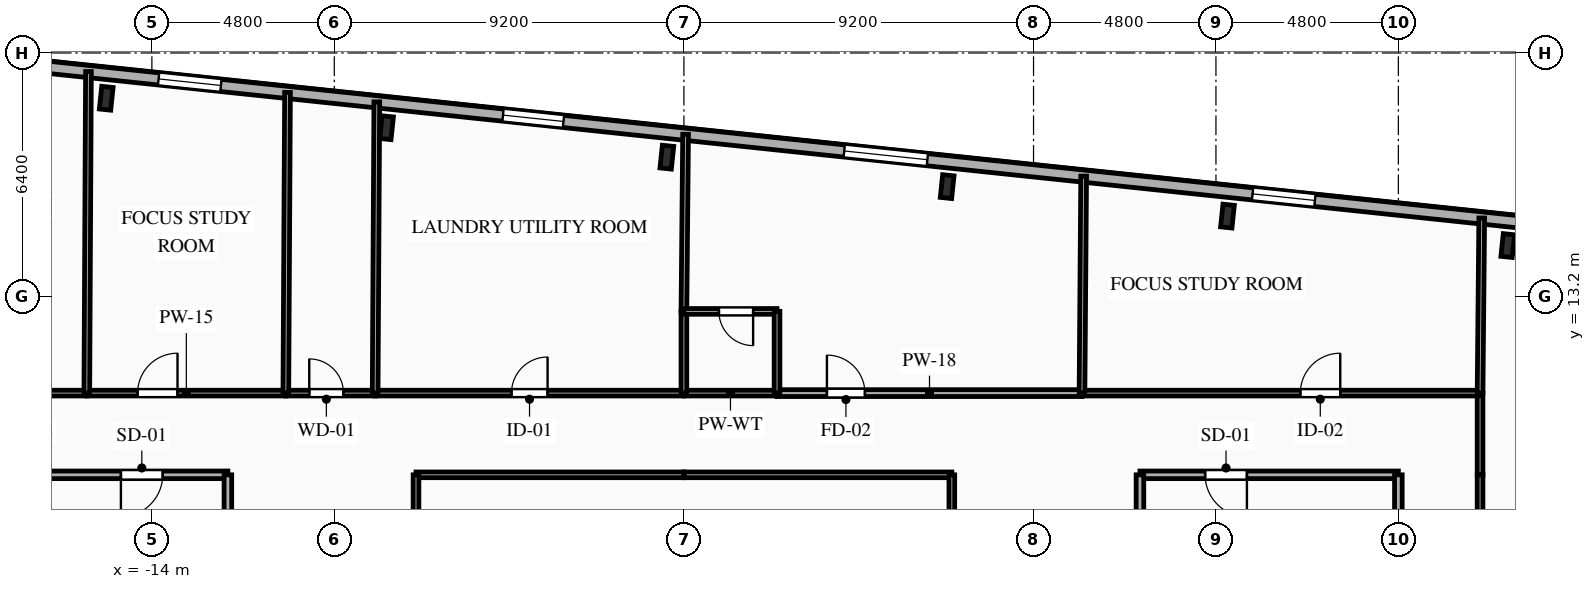
"""IFC4 building model, lengths in metres.
Left out: names, types, materials, properties, quantities, classifications, styles, units other than length and angle.
Written with IfcOpenShell. Run it as: python <this file> out.ifc"""

import sys

from ifc_helpers import new_model, si_unit, direction, frame, frame_2d, origin, origin_2d, place, context, subcontext, project, spatial, rectangle, i_section, extrude, element, fill, save


model = new_model("IFC4")
c1 = context("Model", 3, precision=1e-05, world=origin(), true_north=direction((0.0, 1.0)))
c2 = subcontext(c1, "Body", "Model", "MODEL_VIEW")
j1 = project(units=[si_unit("LENGTHUNIT", "METRE"), si_unit("PLANEANGLEUNIT", "RADIAN")], contexts=[c1])
p1 = place(None, origin())
s1 = spatial("IfcSite", under=j1, at=p1, CompositionType="ELEMENT")
p2 = place(p1, origin())
s2 = spatial("IfcBuilding", under=s1, at=p2, CompositionType="ELEMENT")
p3 = place(p2, frame((0.0, 0.0, 203.1)))
s3 = spatial("IfcBuildingStorey", under=s2, at=p3, CompositionType="ELEMENT", Elevation=203.1)
for number, where, z_axis, x_axis in (
    (1, (21.679, 14.532, 0.0), (0.0, 0.0, 1.0), (0.995, -0.105, 0.0)),
    (2, (14.303, 15.308, 0.0), (0.0, 0.0, 1.0), (0.995, -0.105, 0.0)),
    (3, (6.927, 16.083, 0.0), (0.0, 0.0, 1.0), (0.995, -0.105, 0.0)),
    (4, (-0.449, 16.858, 0.0), (0.0, 0.0, 1.0), (0.995, -0.105, 0.0)),
    (5, (-7.825, 17.634, 0.0), (0.0, 0.0, 1.0), (0.995, -0.105, 0.0)),
    (6, (-15.201, 18.409, 0.0), (0.0, 0.0, 1.0), (0.995, -0.105, 0.0)),
):
    element("IfcColumn", number, at=place(p3, frame(where, z_axis=z_axis, x_axis=x_axis)), inside=s3, PredefinedType="COLUMN", context=c2, shape_type="SweptSolid", body=[
        extrude(i_section(OverallWidth=0.3, OverallDepth=0.6, WebThickness=0.015, FlangeThickness=0.03, FilletRadius=0.027, at=origin_2d()), origin(), (0.0, 0.0, 1.0), 3.35),
    ])
p4 = place(p3, frame((-23.156, 19.898, 0.0), z_axis=(0.0, 0.0, 1.0), x_axis=(0.994522001802, -0.104527450613, 0.0)))
e7 = element("IfcWall", 7, at=p4, inside=s3, PredefinedType="SOLIDWALL", context=c2, shape_type="SweptSolid", body=[
    extrude(rectangle(XDim=45.8, YDim=0.32, at=frame_2d((22.9, 0.0))), origin(), (0.0, 0.0, 1.0), 3.04),
])
p5 = place(p4, frame((4.139, 0.0, 0.85)))
e8 = element("IfcOpeningElement", 8, at=p5, cuts=e7, PredefinedType="OPENING", context=c2, shape_type="SweptSolid", body=[
    extrude(rectangle(XDim=1.65, YDim=1.85, at=frame_2d((0.825, 0.925))), frame((0.0, 0.17, 0.0), z_axis=(0.0, -1.0, 0.0), x_axis=(1.0, 0.0, 0.0)), (0.0, 0.0, 1.0), 0.34),
])
p6 = place(p4, frame((9.384, 0.0, 0.85)))
e9 = element("IfcOpeningElement", 9, at=p6, cuts=e7, PredefinedType="OPENING", context=c2, shape_type="SweptSolid", body=[
    extrude(rectangle(XDim=1.65, YDim=1.85, at=frame_2d((0.825, 0.925))), frame((0.0, 0.17, 0.0), z_axis=(0.0, -1.0, 0.0), x_axis=(1.0, 0.0, 0.0)), (0.0, 0.0, 1.0), 0.34),
])
p7 = place(p4, frame((18.497, 0.0, 0.85)))
e10 = element("IfcOpeningElement", 10, at=p7, cuts=e7, PredefinedType="OPENING", context=c2, shape_type="SweptSolid", body=[
    extrude(rectangle(XDim=1.6, YDim=1.85, at=frame_2d((0.8, 0.925))), frame((0.0, 0.17, 0.0), z_axis=(0.0, -1.0, 0.0), x_axis=(1.0, 0.0, 0.0)), (0.0, 0.0, 1.0), 0.34),
])
p8 = place(p4, frame((27.525, 0.0, 0.85)))
e11 = element("IfcOpeningElement", 11, at=p8, cuts=e7, PredefinedType="OPENING", context=c2, shape_type="SweptSolid", body=[
    extrude(rectangle(XDim=2.2, YDim=1.85, at=frame_2d((1.1, 0.925))), frame((0.0, 0.17, 0.0), z_axis=(0.0, -1.0, 0.0), x_axis=(1.0, 0.0, 0.0)), (0.0, 0.0, 1.0), 0.34),
])
p9 = place(p4, frame((38.329, 0.0, 0.85)))
e12 = element("IfcOpeningElement", 12, at=p9, cuts=e7, PredefinedType="OPENING", context=c2, shape_type="SweptSolid", body=[
    extrude(rectangle(XDim=1.65, YDim=1.85, at=frame_2d((0.825, 0.925))), frame((0.0, 0.17, 0.0), z_axis=(0.0, -1.0, 0.0), x_axis=(1.0, 0.0, 0.0)), (0.0, 0.0, 1.0), 0.34),
])
p10 = place(p3, frame((-12.0, 8.5, 0.0), z_axis=(0.0, 0.0, 1.0), x_axis=(-1.0, 0.0, 0.0)))
e13 = element("IfcWall", 13, at=p10, inside=s3, PredefinedType="PARTITIONING", context=c2, shape_type="SweptSolid", body=[
    extrude(rectangle(XDim=6.8, YDim=0.2, at=frame_2d((3.4, 0.0))), origin(), (0.0, 0.0, 1.0), 3.04),
])
p11 = place(p10, frame((1.715, 0.0, 0.0)))
e14 = element("IfcOpeningElement", 14, at=p11, cuts=e13, PredefinedType="OPENING", context=c2, shape_type="SweptSolid", body=[
    extrude(rectangle(XDim=1.1, YDim=2.15, at=frame_2d((0.55, 1.075))), frame((0.0, 0.11, 0.0), z_axis=(0.0, -1.0, 0.0), x_axis=(1.0, 0.0, 0.0)), (0.0, 0.0, 1.0), 0.22),
])
p12 = place(p3, frame((-12.0, 5.6, 0.0), z_axis=(0.0, 0.0, 1.0), x_axis=(0.0, 1.0, 0.0)))
e15 = element("IfcWall", 15, at=p12, inside=s3, PredefinedType="PARTITIONING", context=c2, shape_type="SweptSolid", body=[
    extrude(rectangle(XDim=2.9, YDim=0.2, at=frame_2d((1.45, 0.0))), origin(), (0.0, 0.0, 1.0), 3.04),
])
p13 = place(p3, frame((18.8, 8.5, 0.0), z_axis=(0.0, 0.0, 1.0), x_axis=(-1.0, 0.0, 0.0)))
e16 = element("IfcWall", 16, at=p13, inside=s3, PredefinedType="PARTITIONING", context=c2, shape_type="SweptSolid", body=[
    extrude(rectangle(XDim=6.8, YDim=0.2, at=frame_2d((3.4, 0.0))), origin(), (0.0, 0.0, 1.0), 3.04),
])
p14 = place(p13, frame((3.985, 0.0, 0.0)))
e17 = element("IfcOpeningElement", 17, at=p14, cuts=e16, PredefinedType="OPENING", context=c2, shape_type="SweptSolid", body=[
    extrude(rectangle(XDim=1.1, YDim=2.15, at=frame_2d((0.55, 1.075))), frame((0.0, 0.11, 0.0), z_axis=(0.0, -1.0, 0.0), x_axis=(1.0, 0.0, 0.0)), (0.0, 0.0, 1.0), 0.22),
])
p15 = place(p3, frame((18.8, 5.6, 0.0), z_axis=(0.0, 0.0, 1.0), x_axis=(0.0, 1.0, 0.0)))
e18 = element("IfcWall", 18, at=p15, inside=s3, PredefinedType="PARTITIONING", context=c2, shape_type="SweptSolid", body=[
    extrude(rectangle(XDim=2.9, YDim=0.2, at=frame_2d((1.45, 0.0))), origin(), (0.0, 0.0, 1.0), 2.665),
])
p16 = place(p3, frame((12.0, 8.5, 0.0), z_axis=(0.0, 0.0, 1.0), x_axis=(0.0, -1.0, 0.0)))
e19 = element("IfcWall", 19, at=p16, inside=s3, PredefinedType="PARTITIONING", context=c2, shape_type="SweptSolid", body=[
    extrude(rectangle(XDim=2.9, YDim=0.2, at=frame_2d((1.45, 0.0))), origin(), (0.0, 0.0, 1.0), 3.04),
])
p17 = place(p3, frame((-20.95, 10.65, 0.0), z_axis=(0.0, 0.0, 1.0), x_axis=(1.0, 0.0, 0.0)))
e20 = element("IfcWall", 20, at=p17, inside=s3, PredefinedType="PARTITIONING", context=c2, shape_type="SweptSolid", body=[
    extrude(rectangle(XDim=5.238, YDim=0.15, at=frame_2d((2.619, 0.0))), origin(), (0.0, 0.0, 1.0), 3.04),
])
p18 = place(p17, frame((3.229, 0.0, 0.0)))
e21 = element("IfcOpeningElement", 21, at=p18, cuts=e20, PredefinedType="OPENING", context=c2, shape_type="SweptSolid", body=[
    extrude(rectangle(XDim=1.05, YDim=2.15, at=frame_2d((0.525, 1.075))), frame((0.0, 0.085, 0.0), z_axis=(0.0, -1.0, 0.0), x_axis=(1.0, 0.0, 0.0)), (0.0, 0.0, 1.0), 0.17),
])
p19 = place(p3, frame((-15.712, 10.65, 0.0), z_axis=(0.0, 0.0, 1.0), x_axis=(1.0, 0.0, 0.0)))
e22 = element("IfcWall", 22, at=p19, inside=s3, PredefinedType="PARTITIONING", context=c2, shape_type="SweptSolid", body=[
    extrude(rectangle(XDim=5.237, YDim=0.15, at=frame_2d((2.619, 0.0))), origin(), (0.0, 0.0, 1.0), 3.04),
])
p20 = place(p19, frame((1.337, 0.0, 0.0)))
e23 = element("IfcOpeningElement", 23, at=p20, cuts=e22, PredefinedType="OPENING", context=c2, shape_type="SweptSolid", body=[
    extrude(rectangle(XDim=1.05, YDim=2.15, at=frame_2d((0.525, 1.075))), frame((0.0, 0.085, 0.0), z_axis=(0.0, -1.0, 0.0), x_axis=(1.0, 0.0, 0.0)), (0.0, 0.0, 1.0), 0.17),
])
p21 = place(p3, frame((-10.475, 10.65, 0.0), z_axis=(0.0, 0.0, 1.0), x_axis=(1.0, 0.0, 0.0)))
e24 = element("IfcWall", 24, at=p21, inside=s3, PredefinedType="PLUMBINGWALL", context=c2, shape_type="SweptSolid", body=[
    extrude(rectangle(XDim=2.35, YDim=0.15, at=frame_2d((1.175, 0.0))), origin(), (0.0, 0.0, 1.0), 3.04),
])
p22 = place(p21, frame((0.616, 0.0, 0.0)))
e25 = element("IfcOpeningElement", 25, at=p22, cuts=e24, PredefinedType="OPENING", context=c2, shape_type="SweptSolid", body=[
    extrude(rectangle(XDim=0.9, YDim=2.1, at=frame_2d((0.45, 1.05))), frame((0.0, 0.085, 0.0), z_axis=(0.0, -1.0, 0.0), x_axis=(1.0, 0.0, 0.0)), (0.0, 0.0, 1.0), 0.17),
])
p23 = place(p3, frame((-8.125, 10.65, 0.0), z_axis=(0.0, 0.0, 1.0), x_axis=(1.0, 0.0, 0.0)))
e26 = element("IfcWall", 26, at=p23, inside=s3, PredefinedType="PARTITIONING", context=c2, shape_type="SweptSolid", body=[
    extrude(rectangle(XDim=8.125, YDim=0.15, at=frame_2d((4.062, 0.0))), origin(), (0.0, 0.0, 1.0), 3.04),
])
p24 = place(p23, frame((3.587, 0.0, 0.0)))
e27 = element("IfcOpeningElement", 27, at=p24, cuts=e26, PredefinedType="OPENING", context=c2, shape_type="SweptSolid", body=[
    extrude(rectangle(XDim=0.95, YDim=2.1, at=frame_2d((0.475, 1.05))), frame((0.0, 0.085, 0.0), z_axis=(0.0, -1.0, 0.0), x_axis=(1.0, 0.0, 0.0)), (0.0, 0.0, 1.0), 0.17),
])
p25 = place(p3, frame((0.0, 8.5, 0.0), z_axis=(0.0, 0.0, 1.0), x_axis=(-1.0, 0.0, 0.0)))
e28 = element("IfcWall", 28, at=p25, inside=s3, PredefinedType="PARTITIONING", context=c2, shape_type="SweptSolid", body=[
    extrude(rectangle(XDim=7.05, YDim=0.15, at=frame_2d((3.525, 0.0))), origin(), (0.0, 0.0, 1.0), 3.04),
])
p26 = place(p3, frame((20.95, 10.65, 0.0), z_axis=(0.0, 0.0, 1.0), x_axis=(0.0, -1.0, 0.0)))
e29 = element("IfcWall", 29, at=p26, inside=s3, PredefinedType="PARTITIONING", context=c2, shape_type="SweptSolid", body=[
    extrude(rectangle(XDim=2.15, YDim=0.15, at=frame_2d((1.075, 0.0))), origin(), (0.0, 0.0, 1.0), 3.04),
])
p27 = place(p3, frame((2.45, 10.65, 0.0), z_axis=(0.0, 0.0, 1.0), x_axis=(1.0, 0.0, 0.0)))
e30 = element("IfcWall", 30, at=p27, inside=s3, PredefinedType="PARTITIONING", context=c2, shape_type="SweptSolid", body=[
    extrude(rectangle(XDim=8.025, YDim=0.18, at=frame_2d((4.013, 0.0))), origin(), (0.0, 0.0, 1.0), 3.04),
])
p28 = place(p27, frame((1.313, 0.0, 0.0)))
e31 = element("IfcOpeningElement", 31, at=p28, cuts=e30, PredefinedType="OPENING", context=c2, shape_type="SweptSolid", body=[
    extrude(rectangle(XDim=1.0, YDim=2.15, at=frame_2d((0.5, 1.075))), frame((0.0, 0.1, 0.0), z_axis=(0.0, -1.0, 0.0), x_axis=(1.0, 0.0, 0.0)), (0.0, 0.0, 1.0), 0.2),
])
p29 = place(p3, frame((0.0, 10.65, 0.0), z_axis=(0.0, 0.0, 1.0), x_axis=(1.0, 0.0, 0.0)))
e32 = element("IfcWall", 32, at=p29, inside=s3, PredefinedType="PLUMBINGWALL", context=c2, shape_type="SweptSolid", body=[
    extrude(rectangle(XDim=2.45, YDim=0.15, at=frame_2d((1.225, 0.0))), origin(), (0.0, 0.0, 1.0), 3.04),
])
p30 = place(p3, frame((10.475, 10.65, 0.0), z_axis=(0.0, 0.0, 1.0), x_axis=(1.0, 0.0, 0.0)))
e33 = element("IfcWall", 33, at=p30, inside=s3, PredefinedType="PARTITIONING", context=c2, shape_type="SweptSolid", body=[
    extrude(rectangle(XDim=10.475, YDim=0.15, at=frame_2d((5.237, 0.0))), origin(), (0.0, 0.0, 1.0), 3.04),
])
p31 = place(p30, frame((5.746, 0.0, 0.0)))
e34 = element("IfcOpeningElement", 34, at=p31, cuts=e33, PredefinedType="OPENING", context=c2, shape_type="SweptSolid", body=[
    extrude(rectangle(XDim=1.05, YDim=2.15, at=frame_2d((0.525, 1.075))), frame((0.0, 0.085, 0.0), z_axis=(0.0, -1.0, 0.0), x_axis=(1.0, 0.0, 0.0)), (0.0, 0.0, 1.0), 0.17),
])
p32 = place(p3, frame((7.05, 8.5, 0.0), z_axis=(0.0, 0.0, 1.0), x_axis=(-1.0, 0.0, 0.0)))
e35 = element("IfcWall", 35, at=p32, inside=s3, PredefinedType="PARTITIONING", context=c2, shape_type="SweptSolid", body=[
    extrude(rectangle(XDim=7.05, YDim=0.15, at=frame_2d((3.525, 0.0))), origin(), (0.0, 0.0, 1.0), 3.04),
])
p33 = place(p3, frame((20.95, 8.5, 0.0), z_axis=(0.0, 0.0, 1.0), x_axis=(0.0, -1.0, 0.0)))
e36 = element("IfcWall", 36, at=p33, inside=s3, PredefinedType="PARTITIONING", context=c2, shape_type="SweptSolid", body=[
    extrude(rectangle(XDim=9.263, YDim=0.15, at=frame_2d((4.632, 0.0))), origin(), (0.0, 0.0, 1.0), 2.695),
])
p34 = place(p33, frame((6.751, 0.0, 0.0)))
e37 = element("IfcOpeningElement", 37, at=p34, cuts=e36, PredefinedType="OPENING", context=c2, shape_type="SweptSolid", body=[
    extrude(rectangle(XDim=1.05, YDim=2.15, at=frame_2d((0.525, 1.075))), frame((0.0, 0.085, 0.0), z_axis=(0.0, -1.0, 0.0), x_axis=(1.0, 0.0, 0.0)), (0.0, 0.0, 1.0), 0.17),
])
for number, where, z_axis, x_axis in (
    (38, (-7.05, 8.5, 0.0), (0.0, 0.0, 1.0), (0.0, -1.0, 0.0)),
    (39, (7.05, -0.8, 0.0), (0.0, 0.0, 1.0), (0.0, 1.0, 0.0)),
):
    element("IfcWall", number, at=place(p3, frame(where, z_axis=z_axis, x_axis=x_axis)), inside=s3, PredefinedType="PARTITIONING", context=c2, shape_type="SweptSolid", body=[
        extrude(rectangle(XDim=9.3, YDim=0.15, at=frame_2d((4.65, 0.0))), origin(), (0.0, 0.0, 1.0), 3.04),
    ])
p35 = place(p3, frame((20.95, 10.65, 0.0), z_axis=(0.0, 0.0, 1.0), x_axis=(0.009535990233, 0.999954531411, 0.0)))
e40 = element("IfcWall", 40, at=p35, inside=s3, PredefinedType="PARTITIONING", context=c2, shape_type="SweptSolid", body=[
    extrude(rectangle(XDim=4.608, YDim=0.15, at=frame_2d((2.304, 0.0))), origin(), (0.0, 0.0, 1.0), 2.665),
])
p36 = place(p3, frame((-15.669, 19.112, 0.0), z_axis=(0.0, 0.0, 1.0), x_axis=(-0.005164534834, -0.999986663701, 0.0)))
e41 = element("IfcWall", 41, at=p36, inside=s3, PredefinedType="PARTITIONING", context=c2, shape_type="SweptSolid", body=[
    extrude(rectangle(XDim=8.462, YDim=0.15, at=frame_2d((4.231, 0.0))), origin(), (0.0, 0.0, 1.0), 2.665),
])
p37 = place(p3, frame((-10.431, 18.561, 0.0), z_axis=(0.0, 0.0, 1.0), x_axis=(-0.005554784069, -0.999984572068, 0.0)))
e42 = element("IfcWall", 42, at=p37, inside=s3, PredefinedType="PLUMBINGWALL", context=c2, shape_type="SweptSolid", body=[
    extrude(rectangle(XDim=7.911, YDim=0.15, at=frame_2d((3.956, 0.0))), origin(), (0.0, 0.0, 1.0), 3.04),
])
p38 = place(p3, frame((-8.081, 18.314, 0.0), z_axis=(0.0, 0.0, 1.0), x_axis=(-0.005733850696, -0.999983561343, 0.0)))
e43 = element("IfcWall", 43, at=p38, inside=s3, PredefinedType="PLUMBINGWALL", context=c2, shape_type="SweptSolid", body=[
    extrude(rectangle(XDim=7.664, YDim=0.15, at=frame_2d((3.832, 0.0))), origin(), (0.0, 0.0, 1.0), 2.665),
])
p39 = place(p3, frame((0.044, 17.46, 0.0), z_axis=(0.0, 0.0, 1.0), x_axis=(-0.009430083116, -0.999955535778, 0.0)))
e44 = element("IfcWall", 44, at=p39, inside=s3, PredefinedType="PARTITIONING", context=c2, shape_type="SweptSolid", body=[
    extrude(rectangle(XDim=4.66, YDim=0.15, at=frame_2d((2.33, 0.0))), origin(), (0.0, 0.0, 1.0), 3.04),
])
p40 = place(p3, frame((0.0, 12.8, 0.0), z_axis=(0.0, 0.0, 1.0), x_axis=(0.0, -1.0, 0.0)))
e45 = element("IfcWall", 45, at=p40, inside=s3, PredefinedType="PLUMBINGWALL", context=c2, shape_type="SweptSolid", body=[
    extrude(rectangle(XDim=2.15, YDim=0.15, at=frame_2d((1.075, 0.0))), origin(), (0.0, 0.0, 1.0), 3.04),
])
p41 = place(p3, frame((2.45, 12.8, 0.0), z_axis=(0.0, 0.0, 1.0), x_axis=(-1.0, 0.0, 0.0)))
e46 = element("IfcWall", 46, at=p41, inside=s3, PredefinedType="PLUMBINGWALL", context=c2, shape_type="SweptSolid", body=[
    extrude(rectangle(XDim=2.45, YDim=0.15, at=frame_2d((1.225, 0.0))), origin(), (0.0, 0.0, 1.0), 3.04),
])
p42 = place(p41, frame((0.629, 0.0, 0.0)))
e47 = element("IfcOpeningElement", 47, at=p42, cuts=e46, PredefinedType="OPENING", context=c2, shape_type="SweptSolid", body=[
    extrude(rectangle(XDim=0.9, YDim=2.1, at=frame_2d((0.45, 1.05))), frame((0.0, 0.085, 0.0), z_axis=(0.0, -1.0, 0.0), x_axis=(1.0, 0.0, 0.0)), (0.0, 0.0, 1.0), 0.17),
])
p43 = place(p3, frame((2.45, 10.65, 0.0), z_axis=(0.0, 0.0, 1.0), x_axis=(0.0, 1.0, 0.0)))
e48 = element("IfcWall", 48, at=p43, inside=s3, PredefinedType="PLUMBINGWALL", context=c2, shape_type="SweptSolid", body=[
    extrude(rectangle(XDim=2.15, YDim=0.15, at=frame_2d((1.075, 0.0))), origin(), (0.0, 0.0, 1.0), 3.04),
])
p44 = place(p3, frame((10.519, 16.359, 0.0), z_axis=(0.0, 0.0, 1.0), x_axis=(-0.007654255135, -0.99997070576, 0.0)))
e49 = element("IfcWall", 49, at=p44, inside=s3, PredefinedType="PARTITIONING", context=c2, shape_type="SweptSolid", body=[
    extrude(rectangle(XDim=5.709, YDim=0.15, at=frame_2d((2.855, 0.0))), origin(), (0.0, 0.0, 1.0), 3.04),
])
p45 = place(p6, origin())
e50 = element("IfcWindow", 50, at=p45, inside=s3, PartitioningType="SINGLE_PANEL", PredefinedType="WINDOW", context=c2, shape_type="SweptSolid", body=[
    extrude(rectangle(XDim=1.65, YDim=1.85, at=frame_2d((0.825, 0.925))), frame((0.0, 0.03, 0.0), z_axis=(0.0, -1.0, 0.0), x_axis=(1.0, 0.0, 0.0)), (0.0, 0.0, 1.0), 0.06),
])
fill(e9, e50)
p46 = place(p7, origin())
e51 = element("IfcWindow", 51, at=p46, inside=s3, PartitioningType="SINGLE_PANEL", PredefinedType="WINDOW", context=c2, shape_type="SweptSolid", body=[
    extrude(rectangle(XDim=1.6, YDim=1.85, at=frame_2d((0.8, 0.925))), frame((0.0, 0.03, 0.0), z_axis=(0.0, -1.0, 0.0), x_axis=(1.0, 0.0, 0.0)), (0.0, 0.0, 1.0), 0.06),
])
fill(e10, e51)
p47 = place(p8, origin())
e52 = element("IfcWindow", 52, at=p47, inside=s3, PartitioningType="SINGLE_PANEL", PredefinedType="WINDOW", context=c2, shape_type="SweptSolid", body=[
    extrude(rectangle(XDim=2.2, YDim=1.85, at=frame_2d((1.1, 0.925))), frame((0.0, 0.03, 0.0), z_axis=(0.0, -1.0, 0.0), x_axis=(1.0, 0.0, 0.0)), (0.0, 0.0, 1.0), 0.06),
])
fill(e11, e52)
p48 = place(p9, origin())
e53 = element("IfcWindow", 53, at=p48, inside=s3, PartitioningType="SINGLE_PANEL", PredefinedType="WINDOW", context=c2, shape_type="SweptSolid", body=[
    extrude(rectangle(XDim=1.65, YDim=1.85, at=frame_2d((0.825, 0.925))), frame((0.0, 0.03, 0.0), z_axis=(0.0, -1.0, 0.0), x_axis=(1.0, 0.0, 0.0)), (0.0, 0.0, 1.0), 0.06),
])
fill(e12, e53)
p49 = place(p11, origin())
e54 = element("IfcDoor", 54, at=p49, inside=s3, OperationType="SINGLE_SWING_RIGHT", PredefinedType="DOOR", context=c2, shape_type="SweptSolid", body=[
    extrude(rectangle(XDim=1.1, YDim=2.15, at=frame_2d((0.55, 1.075))), frame((0.0, 0.025, 0.0), z_axis=(0.0, -1.0, 0.0), x_axis=(1.0, 0.0, 0.0)), (0.0, 0.0, 1.0), 0.05),
])
fill(e14, e54)
p50 = place(p14, origin())
e55 = element("IfcDoor", 55, at=p50, inside=s3, OperationType="SINGLE_SWING_LEFT", PredefinedType="DOOR", context=c2, shape_type="SweptSolid", body=[
    extrude(rectangle(XDim=1.1, YDim=2.15, at=frame_2d((0.55, 1.075))), frame((0.0, 0.025, 0.0), z_axis=(0.0, -1.0, 0.0), x_axis=(1.0, 0.0, 0.0)), (0.0, 0.0, 1.0), 0.05),
])
fill(e17, e55)
p51 = place(p20, origin())
e56 = element("IfcDoor", 56, at=p51, inside=s3, OperationType="SINGLE_SWING_RIGHT", PredefinedType="DOOR", context=c2, shape_type="SweptSolid", body=[
    extrude(rectangle(XDim=1.05, YDim=2.15, at=frame_2d((0.525, 1.075))), frame((0.0, 0.025, 0.0), z_axis=(0.0, -1.0, 0.0), x_axis=(1.0, 0.0, 0.0)), (0.0, 0.0, 1.0), 0.05),
])
fill(e23, e56)
p52 = place(p22, origin())
e57 = element("IfcDoor", 57, at=p52, inside=s3, OperationType="SINGLE_SWING_LEFT", PredefinedType="DOOR", context=c2, shape_type="SweptSolid", body=[
    extrude(rectangle(XDim=0.9, YDim=2.1, at=frame_2d((0.45, 1.05))), frame((0.0, 0.025, 0.0), z_axis=(0.0, -1.0, 0.0), x_axis=(1.0, 0.0, 0.0)), (0.0, 0.0, 1.0), 0.05),
])
fill(e25, e57)
p53 = place(p24, origin())
e58 = element("IfcDoor", 58, at=p53, inside=s3, OperationType="SINGLE_SWING_RIGHT", PredefinedType="DOOR", context=c2, shape_type="SweptSolid", body=[
    extrude(rectangle(XDim=0.95, YDim=2.1, at=frame_2d((0.475, 1.05))), frame((0.0, 0.025, 0.0), z_axis=(0.0, -1.0, 0.0), x_axis=(1.0, 0.0, 0.0)), (0.0, 0.0, 1.0), 0.05),
])
fill(e27, e58)
p54 = place(p28, origin())
e59 = element("IfcDoor", 59, at=p54, inside=s3, OperationType="SINGLE_SWING_LEFT", PredefinedType="DOOR", context=c2, shape_type="SweptSolid", body=[
    extrude(rectangle(XDim=1.0, YDim=2.15, at=frame_2d((0.5, 1.075))), frame((0.0, 0.025, 0.0), z_axis=(0.0, -1.0, 0.0), x_axis=(1.0, 0.0, 0.0)), (0.0, 0.0, 1.0), 0.05),
])
fill(e31, e59)
p55 = place(p31, origin())
e60 = element("IfcDoor", 60, at=p55, inside=s3, OperationType="SINGLE_SWING_RIGHT", PredefinedType="DOOR", context=c2, shape_type="SweptSolid", body=[
    extrude(rectangle(XDim=1.05, YDim=2.15, at=frame_2d((0.525, 1.075))), frame((0.0, 0.025, 0.0), z_axis=(0.0, -1.0, 0.0), x_axis=(1.0, 0.0, 0.0)), (0.0, 0.0, 1.0), 0.05),
])
fill(e34, e60)
p56 = place(p42, origin())
e61 = element("IfcDoor", 61, at=p56, inside=s3, OperationType="SINGLE_SWING_LEFT", PredefinedType="DOOR", context=c2, shape_type="SweptSolid", body=[
    extrude(rectangle(XDim=0.9, YDim=2.1, at=frame_2d((0.45, 1.05))), frame((0.0, 0.025, 0.0), z_axis=(0.0, -1.0, 0.0), x_axis=(1.0, 0.0, 0.0)), (0.0, 0.0, 1.0), 0.05),
])
fill(e47, e61)
save(model, sys.argv[1])
